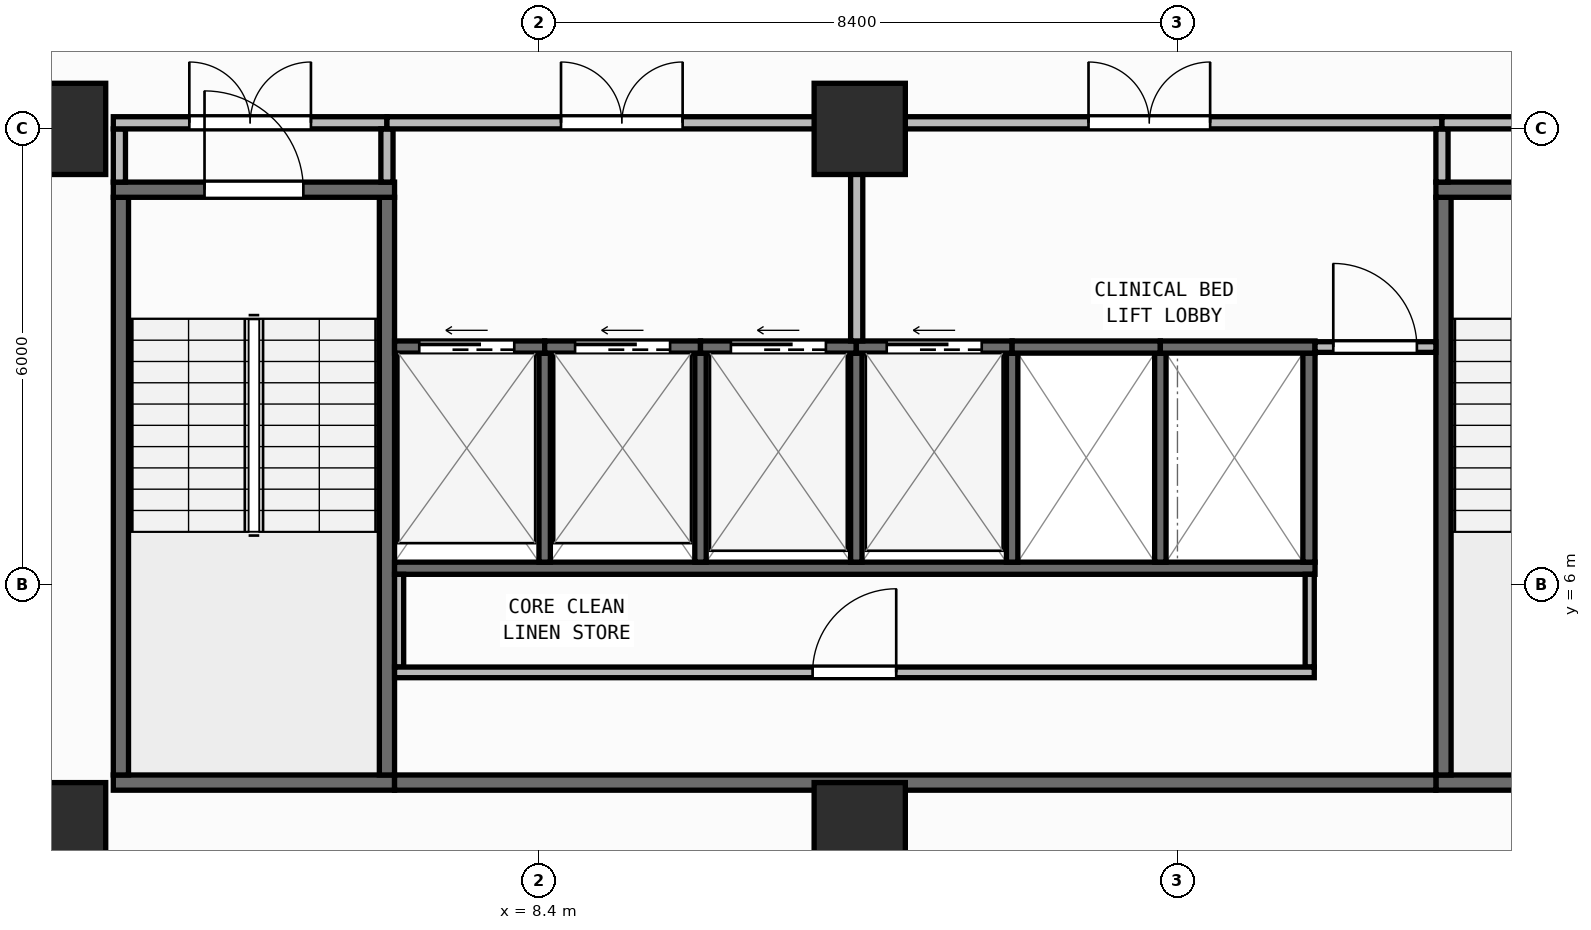
"""IFC4 building model, lengths in metres.
Left out: names, types, materials, properties, quantities, classifications, styles, units other than length and angle.
Written with IfcOpenShell. Run it as: python <this file> out.ifc"""

import sys

from ifc_helpers import new_model, si_unit, direction, frame, frame_2d, origin, origin_2d, place, context, subcontext, project, spatial, rectangle, extrude, element, fill, save


model = new_model("IFC4")
c1 = context("Model", 3, precision=1e-05, world=origin(), true_north=direction((0.0, 1.0)))
c2 = subcontext(c1, "Body", "Model", "MODEL_VIEW")
j1 = project(units=[si_unit("LENGTHUNIT", "METRE"), si_unit("PLANEANGLEUNIT", "RADIAN")], contexts=[c1])
p1 = place(None, origin())
s1 = spatial("IfcSite", under=j1, at=p1, CompositionType="ELEMENT")
p2 = place(p1, origin())
s2 = spatial("IfcBuilding", under=s1, at=p2, CompositionType="ELEMENT")
p3 = place(p2, frame((0.0, 0.0, 115.2)))
s3 = spatial("IfcBuildingStorey", under=s2, at=p3, CompositionType="ELEMENT", Elevation=115.2)
for number, where, z_axis, x_axis in (
    (1, (2.1, 2.8, 0.0), (0.0, 0.0, 1.0), (1.0, 0.0, 0.0)),
    (2, (12.62, 2.8, 0.0), (0.0, 0.0, 1.0), (1.0, 0.0, 0.0)),
    (3, (2.1, 12.0, 0.0), (0.0, 0.0, 1.0), (1.0, 0.0, 0.0)),
    (4, (12.62, 12.0, 0.0), (0.0, 0.0, 1.0), (1.0, 0.0, 0.0)),
):
    element("IfcColumn", number, at=place(p3, frame(where, z_axis=z_axis, x_axis=x_axis)), inside=s3, PredefinedType="COLUMN", context=c2, shape_type="SweptSolid", body=[
        extrude(rectangle(XDim=1.2, YDim=1.2, at=origin_2d()), origin(), (0.0, 0.0, 1.0), 3.95),
    ])
p4 = place(p3, frame((2.76, 0.173, 0.0), z_axis=(0.0, 0.0, 1.0), x_axis=(0.996857931723, 0.079210251617, 0.0)))
e5 = element("IfcWall", 5, at=p4, inside=s3, PredefinedType="STANDARD", context=c2, shape_type="SweptSolid", body=[
    extrude(rectangle(XDim=51.442, YDim=0.26, at=frame_2d((25.721, 0.0))), origin(), (0.0, 0.0, 1.0), 3.71),
])
p5 = place(p4, frame((24.521, 0.0, 0.9)))
e6 = element("IfcOpeningElement", 6, at=p5, cuts=e5, PredefinedType="OPENING", context=c2, shape_type="SweptSolid", body=[
    extrude(rectangle(XDim=2.4, YDim=1.65, at=frame_2d((1.2, 0.825))), frame((0.0, 0.14, 0.0), z_axis=(0.0, -1.0, 0.0), x_axis=(1.0, 0.0, 0.0)), (0.0, 0.0, 1.0), 0.28),
])
p6 = place(p3, frame((2.8, 3.4, 0.0), z_axis=(0.0, 0.0, 1.0), x_axis=(1.0, 0.0, 0.0)))
e7 = element("IfcWall", 7, at=p6, inside=s3, PredefinedType="SHEAR", context=c2, shape_type="SweptSolid", body=[
    extrude(rectangle(XDim=3.7, YDim=0.2, at=frame_2d((1.85, 0.0))), origin(), (0.0, 0.0, 1.0), 3.71),
])
for number, where, z_axis, x_axis in (
    (8, (2.9, 3.5, 0.0), (0.0, 0.0, 1.0), (0.0, 1.0, 0.0)),
    (9, (6.4, 3.5, 0.0), (0.0, 0.0, 1.0), (0.0, 1.0, 0.0)),
):
    element("IfcWall", number, at=place(p3, frame(where, z_axis=z_axis, x_axis=x_axis)), inside=s3, PredefinedType="SHEAR", context=c2, shape_type="SweptSolid", body=[
        extrude(rectangle(XDim=7.6, YDim=0.2, at=frame_2d((3.8, 0.0))), origin(), (0.0, 0.0, 1.0), 3.71),
    ])
p7 = place(p3, frame((2.8, 11.2, 0.0), z_axis=(0.0, 0.0, 1.0), x_axis=(1.0, 0.0, 0.0)))
e10 = element("IfcWall", 10, at=p7, inside=s3, PredefinedType="SHEAR", context=c2, shape_type="SweptSolid", body=[
    extrude(rectangle(XDim=3.7, YDim=0.2, at=frame_2d((1.85, 0.0))), origin(), (0.0, 0.0, 1.0), 3.71),
])
p8 = place(p7, frame((1.2, 0.0, 0.0)))
e11 = element("IfcOpeningElement", 11, at=p8, cuts=e10, PredefinedType="OPENING", context=c2, shape_type="SweptSolid", body=[
    extrude(rectangle(XDim=1.3, YDim=2.15, at=frame_2d((0.65, 1.075))), frame((0.0, 0.11, 0.0), z_axis=(0.0, -1.0, 0.0), x_axis=(1.0, 0.0, 0.0)), (0.0, 0.0, 1.0), 0.22),
])
p9 = place(p3, frame((20.2, 3.4, 0.0), z_axis=(0.0, 0.0, 1.0), x_axis=(1.0, 0.0, 0.0)))
e12 = element("IfcWall", 12, at=p9, inside=s3, PredefinedType="SHEAR", context=c2, shape_type="SweptSolid", body=[
    extrude(rectangle(XDim=3.7, YDim=0.2, at=frame_2d((1.85, 0.0))), origin(), (0.0, 0.0, 1.0), 3.71),
])
p10 = place(p3, frame((20.3, 3.5, 0.0), z_axis=(0.0, 0.0, 1.0), x_axis=(0.0, 1.0, 0.0)))
e13 = element("IfcWall", 13, at=p10, inside=s3, PredefinedType="SHEAR", context=c2, shape_type="SweptSolid", body=[
    extrude(rectangle(XDim=7.6, YDim=0.2, at=frame_2d((3.8, 0.0))), origin(), (0.0, 0.0, 1.0), 3.71),
])
p11 = place(p3, frame((20.2, 11.2, 0.0), z_axis=(0.0, 0.0, 1.0), x_axis=(1.0, 0.0, 0.0)))
e14 = element("IfcWall", 14, at=p11, inside=s3, PredefinedType="SHEAR", context=c2, shape_type="SweptSolid", body=[
    extrude(rectangle(XDim=3.7, YDim=0.2, at=frame_2d((1.85, 0.0))), origin(), (0.0, 0.0, 1.0), 3.71),
])
p12 = place(p11, frame((1.2, 0.0, 0.0)))
e15 = element("IfcOpeningElement", 15, at=p12, cuts=e14, PredefinedType="OPENING", context=c2, shape_type="SweptSolid", body=[
    extrude(rectangle(XDim=1.3, YDim=2.15, at=frame_2d((0.65, 1.075))), frame((0.0, 0.11, 0.0), z_axis=(0.0, -1.0, 0.0), x_axis=(1.0, 0.0, 0.0)), (0.0, 0.0, 1.0), 0.22),
])
p13 = place(p3, frame((6.5, 3.4, 0.0), z_axis=(0.0, 0.0, 1.0), x_axis=(1.0, 0.0, 0.0)))
e16 = element("IfcWall", 16, at=p13, inside=s3, PredefinedType="SHEAR", context=c2, shape_type="SweptSolid", body=[
    extrude(rectangle(XDim=13.7, YDim=0.2, at=frame_2d((6.85, 0.0))), origin(), (0.0, 0.0, 1.0), 3.71),
])
p14 = place(p3, frame((6.5, 6.22, 0.0), z_axis=(0.0, 0.0, 1.0), x_axis=(1.0, 0.0, 0.0)))
e17 = element("IfcWall", 17, at=p14, inside=s3, PredefinedType="SHEAR", context=c2, shape_type="SweptSolid", body=[
    extrude(rectangle(XDim=12.11, YDim=0.16, at=frame_2d((6.055, 0.0))), origin(), (0.0, 0.0, 1.0), 3.71),
])
p15 = place(p3, frame((18.53, 6.3, 0.0), z_axis=(0.0, 0.0, 1.0), x_axis=(0.0, 1.0, 0.0)))
e18 = element("IfcWall", 18, at=p15, inside=s3, PredefinedType="SHEAR", context=c2, shape_type="SweptSolid", body=[
    extrude(rectangle(XDim=2.75, YDim=0.16, at=frame_2d((1.375, 0.0))), origin(), (0.0, 0.0, 1.0), 3.71),
])
for number, where, z_axis, x_axis in (
    (19, (8.475, 6.3, 0.0), (0.0, 0.0, 1.0), (0.0, 1.0, 0.0)),
    (20, (10.525, 6.3, 0.0), (0.0, 0.0, 1.0), (0.0, 1.0, 0.0)),
    (21, (12.575, 6.3, 0.0), (0.0, 0.0, 1.0), (0.0, 1.0, 0.0)),
    (22, (14.625, 6.3, 0.0), (0.0, 0.0, 1.0), (0.0, 1.0, 0.0)),
    (23, (16.575, 6.3, 0.0), (0.0, 0.0, 1.0), (0.0, 1.0, 0.0)),
):
    element("IfcWall", number, at=place(p3, frame(where, z_axis=z_axis, x_axis=x_axis)), inside=s3, PredefinedType="SHEAR", context=c2, shape_type="SweptSolid", body=[
        extrude(rectangle(XDim=2.75, YDim=0.15, at=frame_2d((1.375, 0.0))), origin(), (0.0, 0.0, 1.0), 3.71),
    ])
p16 = place(p3, frame((6.5, 9.13, 0.0), z_axis=(0.0, 0.0, 1.0), x_axis=(1.0, 0.0, 0.0)))
e24 = element("IfcWall", 24, at=p16, inside=s3, PredefinedType="SHEAR", context=c2, shape_type="SweptSolid", body=[
    extrude(rectangle(XDim=1.975, YDim=0.16, at=frame_2d((0.988, 0.0))), origin(), (0.0, 0.0, 1.0), 3.71),
])
p17 = place(p16, frame((0.325, 0.0, 0.0)))
e25 = element("IfcOpeningElement", 25, at=p17, cuts=e24, PredefinedType="OPENING", context=c2, shape_type="SweptSolid", body=[
    extrude(rectangle(XDim=1.25, YDim=2.15, at=frame_2d((0.625, 1.075))), frame((0.0, 0.09, 0.0), z_axis=(0.0, -1.0, 0.0), x_axis=(1.0, 0.0, 0.0)), (0.0, 0.0, 1.0), 0.18),
])
p18 = place(p3, frame((8.475, 9.13, 0.0), z_axis=(0.0, 0.0, 1.0), x_axis=(1.0, 0.0, 0.0)))
e26 = element("IfcWall", 26, at=p18, inside=s3, PredefinedType="SHEAR", context=c2, shape_type="SweptSolid", body=[
    extrude(rectangle(XDim=2.05, YDim=0.16, at=frame_2d((1.025, 0.0))), origin(), (0.0, 0.0, 1.0), 3.71),
])
p19 = place(p18, frame((0.4, 0.0, 0.0)))
e27 = element("IfcOpeningElement", 27, at=p19, cuts=e26, PredefinedType="OPENING", context=c2, shape_type="SweptSolid", body=[
    extrude(rectangle(XDim=1.25, YDim=2.15, at=frame_2d((0.625, 1.075))), frame((0.0, 0.09, 0.0), z_axis=(0.0, -1.0, 0.0), x_axis=(1.0, 0.0, 0.0)), (0.0, 0.0, 1.0), 0.18),
])
p20 = place(p3, frame((10.525, 9.13, 0.0), z_axis=(0.0, 0.0, 1.0), x_axis=(1.0, 0.0, 0.0)))
e28 = element("IfcWall", 28, at=p20, inside=s3, PredefinedType="SHEAR", context=c2, shape_type="SweptSolid", body=[
    extrude(rectangle(XDim=2.05, YDim=0.16, at=frame_2d((1.025, 0.0))), origin(), (0.0, 0.0, 1.0), 3.71),
])
p21 = place(p20, frame((0.4, 0.0, 0.0)))
e29 = element("IfcOpeningElement", 29, at=p21, cuts=e28, PredefinedType="OPENING", context=c2, shape_type="SweptSolid", body=[
    extrude(rectangle(XDim=1.25, YDim=2.15, at=frame_2d((0.625, 1.075))), frame((0.0, 0.09, 0.0), z_axis=(0.0, -1.0, 0.0), x_axis=(1.0, 0.0, 0.0)), (0.0, 0.0, 1.0), 0.18),
])
p22 = place(p3, frame((12.575, 9.13, 0.0), z_axis=(0.0, 0.0, 1.0), x_axis=(1.0, 0.0, 0.0)))
e30 = element("IfcWall", 30, at=p22, inside=s3, PredefinedType="SHEAR", context=c2, shape_type="SweptSolid", body=[
    extrude(rectangle(XDim=2.05, YDim=0.16, at=frame_2d((1.025, 0.0))), origin(), (0.0, 0.0, 1.0), 3.71),
])
p23 = place(p22, frame((0.4, 0.0, 0.0)))
e31 = element("IfcOpeningElement", 31, at=p23, cuts=e30, PredefinedType="OPENING", context=c2, shape_type="SweptSolid", body=[
    extrude(rectangle(XDim=1.25, YDim=2.15, at=frame_2d((0.625, 1.075))), frame((0.0, 0.09, 0.0), z_axis=(0.0, -1.0, 0.0), x_axis=(1.0, 0.0, 0.0)), (0.0, 0.0, 1.0), 0.18),
])
p24 = place(p3, frame((14.625, 9.13, 0.0), z_axis=(0.0, 0.0, 1.0), x_axis=(1.0, 0.0, 0.0)))
e32 = element("IfcWall", 32, at=p24, inside=s3, PredefinedType="SHEAR", context=c2, shape_type="SweptSolid", body=[
    extrude(rectangle(XDim=1.95, YDim=0.16, at=frame_2d((0.975, 0.0))), origin(), (0.0, 0.0, 1.0), 3.71),
])
p25 = place(p3, frame((16.575, 9.13, 0.0), z_axis=(0.0, 0.0, 1.0), x_axis=(1.0, 0.0, 0.0)))
e33 = element("IfcWall", 33, at=p25, inside=s3, PredefinedType="SHEAR", context=c2, shape_type="SweptSolid", body=[
    extrude(rectangle(XDim=2.035, YDim=0.16, at=frame_2d((1.018, 0.0))), origin(), (0.0, 0.0, 1.0), 3.71),
])
for number, where, z_axis, x_axis in (
    (34, (6.56, 4.92, 0.0), (0.0, 0.0, 1.0), (0.0, 1.0, 0.0)),
    (35, (18.54, 4.92, 0.0), (0.0, 0.0, 1.0), (0.0, 1.0, 0.0)),
):
    element("IfcWall", number, at=place(p3, frame(where, z_axis=z_axis, x_axis=x_axis)), inside=s3, PredefinedType="PARTITIONING", context=c2, shape_type="SweptSolid", body=[
        extrude(rectangle(XDim=1.22, YDim=0.12, at=frame_2d((0.61, 0.0))), origin(), (0.0, 0.0, 1.0), 3.71),
    ])
p26 = place(p3, frame((6.5, 4.85, 0.0), z_axis=(0.0, 0.0, 1.0), x_axis=(1.0, 0.0, 0.0)))
e36 = element("IfcWall", 36, at=p26, inside=s3, PredefinedType="PARTITIONING", context=c2, shape_type="SweptSolid", body=[
    extrude(rectangle(XDim=12.1, YDim=0.14, at=frame_2d((6.05, 0.0))), origin(), (0.0, 0.0, 1.0), 3.71),
])
p27 = place(p26, frame((5.5, 0.0, 0.0)))
e37 = element("IfcOpeningElement", 37, at=p27, cuts=e36, PredefinedType="OPENING", context=c2, shape_type="SweptSolid", body=[
    extrude(rectangle(XDim=1.1, YDim=2.1, at=frame_2d((0.55, 1.05))), frame((0.0, 0.08, 0.0), z_axis=(0.0, -1.0, 0.0), x_axis=(1.0, 0.0, 0.0)), (0.0, 0.0, 1.0), 0.16),
])
p28 = place(p3, frame((18.61, 9.13, 0.0), z_axis=(0.0, 0.0, 1.0), x_axis=(1.0, 0.0, 0.0)))
e38 = element("IfcWall", 38, at=p28, inside=s3, PredefinedType="PARTITIONING", context=c2, shape_type="SweptSolid", body=[
    extrude(rectangle(XDim=1.59, YDim=0.14, at=frame_2d((0.795, 0.0))), origin(), (0.0, 0.0, 1.0), 3.71),
])
p29 = place(p28, frame((0.24, 0.0, 0.0)))
e39 = element("IfcOpeningElement", 39, at=p29, cuts=e38, PredefinedType="OPENING", context=c2, shape_type="SweptSolid", body=[
    extrude(rectangle(XDim=1.1, YDim=2.1, at=frame_2d((0.55, 1.05))), frame((0.0, 0.08, 0.0), z_axis=(0.0, -1.0, 0.0), x_axis=(1.0, 0.0, 0.0)), (0.0, 0.0, 1.0), 0.16),
])
p30 = place(p3, frame((2.88, 11.3, 0.0), z_axis=(0.0, 0.0, 1.0), x_axis=(0.0, 1.0, 0.0)))
e40 = element("IfcWall", 40, at=p30, inside=s3, PredefinedType="PARTITIONING", context=c2, shape_type="SweptSolid", body=[
    extrude(rectangle(XDim=0.7, YDim=0.16, at=frame_2d((0.35, 0.0))), origin(), (0.0, 0.0, 1.0), 3.71),
])
p31 = place(p3, frame((2.8, 12.08, 0.0), z_axis=(0.0, 0.0, 1.0), x_axis=(1.0, 0.0, 0.0)))
e41 = element("IfcWall", 41, at=p31, inside=s3, PredefinedType="PARTITIONING", context=c2, shape_type="SweptSolid", body=[
    extrude(rectangle(XDim=3.6, YDim=0.16, at=frame_2d((1.8, 0.0))), origin(), (0.0, 0.0, 1.0), 3.083),
])
p32 = place(p31, frame((1.0, 0.0, 0.0)))
e42 = element("IfcOpeningElement", 42, at=p32, cuts=e41, PredefinedType="OPENING", context=c2, shape_type="SweptSolid", body=[
    extrude(rectangle(XDim=1.6, YDim=2.05, at=frame_2d((0.8, 1.025))), frame((0.0, 0.09, 0.0), z_axis=(0.0, -1.0, 0.0), x_axis=(1.0, 0.0, 0.0)), (0.0, 0.0, 1.0), 0.18),
])
p33 = place(p3, frame((6.4, 11.3, 0.0), z_axis=(0.0, 0.0, 1.0), x_axis=(0.0, 1.0, 0.0)))
e43 = element("IfcWall", 43, at=p33, inside=s3, PredefinedType="PARTITIONING", context=c2, shape_type="SweptSolid", body=[
    extrude(rectangle(XDim=0.7, YDim=0.16, at=frame_2d((0.35, 0.0))), origin(), (0.0, 0.0, 1.0), 3.71),
])
p34 = place(p3, frame((6.4, 12.08, 0.0), z_axis=(0.0, 0.0, 1.0), x_axis=(1.0, 0.0, 0.0)))
e44 = element("IfcWall", 44, at=p34, inside=s3, PredefinedType="PARTITIONING", context=c2, shape_type="SweptSolid", body=[
    extrude(rectangle(XDim=6.18, YDim=0.16, at=frame_2d((3.09, 0.0))), origin(), (0.0, 0.0, 1.0), 3.083),
])
p35 = place(p34, frame((2.29, 0.0, 0.0)))
e45 = element("IfcOpeningElement", 45, at=p35, cuts=e44, PredefinedType="OPENING", context=c2, shape_type="SweptSolid", body=[
    extrude(rectangle(XDim=1.6, YDim=2.05, at=frame_2d((0.8, 1.025))), frame((0.0, 0.09, 0.0), z_axis=(0.0, -1.0, 0.0), x_axis=(1.0, 0.0, 0.0)), (0.0, 0.0, 1.0), 0.18),
])
p36 = place(p3, frame((12.58, 9.21, 0.0), z_axis=(0.0, 0.0, 1.0), x_axis=(0.0, 1.0, 0.0)))
e46 = element("IfcWall", 46, at=p36, inside=s3, PredefinedType="PARTITIONING", context=c2, shape_type="SweptSolid", body=[
    extrude(rectangle(XDim=2.79, YDim=0.16, at=frame_2d((1.395, 0.0))), origin(), (0.0, 0.0, 1.0), 3.71),
])
p37 = place(p3, frame((12.58, 12.08, 0.0), z_axis=(0.0, 0.0, 1.0), x_axis=(1.0, 0.0, 0.0)))
e47 = element("IfcWall", 47, at=p37, inside=s3, PredefinedType="PARTITIONING", context=c2, shape_type="SweptSolid", body=[
    extrude(rectangle(XDim=7.7, YDim=0.16, at=frame_2d((3.85, 0.0))), origin(), (0.0, 0.0, 1.0), 3.083),
])
p38 = place(p37, frame((3.05, 0.0, 0.0)))
e48 = element("IfcOpeningElement", 48, at=p38, cuts=e47, PredefinedType="OPENING", context=c2, shape_type="SweptSolid", body=[
    extrude(rectangle(XDim=1.6, YDim=2.05, at=frame_2d((0.8, 1.025))), frame((0.0, 0.09, 0.0), z_axis=(0.0, -1.0, 0.0), x_axis=(1.0, 0.0, 0.0)), (0.0, 0.0, 1.0), 0.18),
])
p39 = place(p3, frame((20.28, 11.3, 0.0), z_axis=(0.0, 0.0, 1.0), x_axis=(0.0, 1.0, 0.0)))
e49 = element("IfcWall", 49, at=p39, inside=s3, PredefinedType="PARTITIONING", context=c2, shape_type="SweptSolid", body=[
    extrude(rectangle(XDim=0.7, YDim=0.16, at=frame_2d((0.35, 0.0))), origin(), (0.0, 0.0, 1.0), 3.71),
])
p40 = place(p3, frame((20.28, 12.08, 0.0), z_axis=(0.0, 0.0, 1.0), x_axis=(1.0, 0.0, 0.0)))
e50 = element("IfcWall", 50, at=p40, inside=s3, PredefinedType="PARTITIONING", context=c2, shape_type="SweptSolid", body=[
    extrude(rectangle(XDim=3.62, YDim=0.16, at=frame_2d((1.81, 0.0))), origin(), (0.0, 0.0, 1.0), 3.083),
])
p41 = place(p40, frame((1.01, 0.0, 0.0)))
e51 = element("IfcOpeningElement", 51, at=p41, cuts=e50, PredefinedType="OPENING", context=c2, shape_type="SweptSolid", body=[
    extrude(rectangle(XDim=1.6, YDim=2.05, at=frame_2d((0.8, 1.025))), frame((0.0, 0.09, 0.0), z_axis=(0.0, -1.0, 0.0), x_axis=(1.0, 0.0, 0.0)), (0.0, 0.0, 1.0), 0.18),
])
p42 = place(p8, origin())
e52 = element("IfcDoor", 52, at=p42, inside=s3, OperationType="SINGLE_SWING_LEFT", PredefinedType="DOOR", context=c2, shape_type="SweptSolid", body=[
    extrude(rectangle(XDim=1.3, YDim=2.15, at=frame_2d((0.65, 1.075))), frame((0.0, 0.025, 0.0), z_axis=(0.0, -1.0, 0.0), x_axis=(1.0, 0.0, 0.0)), (0.0, 0.0, 1.0), 0.05),
])
fill(e11, e52)
p43 = place(p17, origin())
e53 = element("IfcDoor", 53, at=p43, inside=s3, OperationType="SLIDING_TO_LEFT", PredefinedType="DOOR", context=c2, shape_type="SweptSolid", body=[
    extrude(rectangle(XDim=1.25, YDim=2.15, at=frame_2d((0.625, 1.075))), frame((0.0, 0.025, 0.0), z_axis=(0.0, -1.0, 0.0), x_axis=(1.0, 0.0, 0.0)), (0.0, 0.0, 1.0), 0.05),
])
fill(e25, e53)
p44 = place(p19, origin())
e54 = element("IfcDoor", 54, at=p44, inside=s3, OperationType="SLIDING_TO_LEFT", PredefinedType="DOOR", context=c2, shape_type="SweptSolid", body=[
    extrude(rectangle(XDim=1.25, YDim=2.15, at=frame_2d((0.625, 1.075))), frame((0.0, 0.025, 0.0), z_axis=(0.0, -1.0, 0.0), x_axis=(1.0, 0.0, 0.0)), (0.0, 0.0, 1.0), 0.05),
])
fill(e27, e54)
p45 = place(p21, origin())
e55 = element("IfcDoor", 55, at=p45, inside=s3, OperationType="SLIDING_TO_LEFT", PredefinedType="DOOR", context=c2, shape_type="SweptSolid", body=[
    extrude(rectangle(XDim=1.25, YDim=2.15, at=frame_2d((0.625, 1.075))), frame((0.0, 0.025, 0.0), z_axis=(0.0, -1.0, 0.0), x_axis=(1.0, 0.0, 0.0)), (0.0, 0.0, 1.0), 0.05),
])
fill(e29, e55)
p46 = place(p23, origin())
e56 = element("IfcDoor", 56, at=p46, inside=s3, OperationType="SLIDING_TO_LEFT", PredefinedType="DOOR", context=c2, shape_type="SweptSolid", body=[
    extrude(rectangle(XDim=1.25, YDim=2.15, at=frame_2d((0.625, 1.075))), frame((0.0, 0.025, 0.0), z_axis=(0.0, -1.0, 0.0), x_axis=(1.0, 0.0, 0.0)), (0.0, 0.0, 1.0), 0.05),
])
fill(e31, e56)
p47 = place(p27, origin())
e57 = element("IfcDoor", 57, at=p47, inside=s3, OperationType="SINGLE_SWING_RIGHT", PredefinedType="DOOR", context=c2, shape_type="SweptSolid", body=[
    extrude(rectangle(XDim=1.1, YDim=2.1, at=frame_2d((0.55, 1.05))), frame((0.0, 0.025, 0.0), z_axis=(0.0, -1.0, 0.0), x_axis=(1.0, 0.0, 0.0)), (0.0, 0.0, 1.0), 0.05),
])
fill(e37, e57)
p48 = place(p29, origin())
e58 = element("IfcDoor", 58, at=p48, inside=s3, OperationType="SINGLE_SWING_LEFT", PredefinedType="DOOR", context=c2, shape_type="SweptSolid", body=[
    extrude(rectangle(XDim=1.1, YDim=2.1, at=frame_2d((0.55, 1.05))), frame((0.0, 0.025, 0.0), z_axis=(0.0, -1.0, 0.0), x_axis=(1.0, 0.0, 0.0)), (0.0, 0.0, 1.0), 0.05),
])
fill(e39, e58)
p49 = place(p32, origin())
e59 = element("IfcDoor", 59, at=p49, inside=s3, OperationType="DOUBLE_DOOR_SINGLE_SWING", PredefinedType="DOOR", context=c2, shape_type="SweptSolid", body=[
    extrude(rectangle(XDim=1.6, YDim=2.05, at=frame_2d((0.8, 1.025))), frame((0.0, 0.025, 0.0), z_axis=(0.0, -1.0, 0.0), x_axis=(1.0, 0.0, 0.0)), (0.0, 0.0, 1.0), 0.05),
])
fill(e42, e59)
p50 = place(p35, origin())
e60 = element("IfcDoor", 60, at=p50, inside=s3, OperationType="DOUBLE_DOOR_SINGLE_SWING", PredefinedType="DOOR", context=c2, shape_type="SweptSolid", body=[
    extrude(rectangle(XDim=1.6, YDim=2.05, at=frame_2d((0.8, 1.025))), frame((0.0, 0.025, 0.0), z_axis=(0.0, -1.0, 0.0), x_axis=(1.0, 0.0, 0.0)), (0.0, 0.0, 1.0), 0.05),
])
fill(e45, e60)
p51 = place(p38, origin())
e61 = element("IfcDoor", 61, at=p51, inside=s3, OperationType="DOUBLE_DOOR_SINGLE_SWING", PredefinedType="DOOR", context=c2, shape_type="SweptSolid", body=[
    extrude(rectangle(XDim=1.6, YDim=2.05, at=frame_2d((0.8, 1.025))), frame((0.0, 0.025, 0.0), z_axis=(0.0, -1.0, 0.0), x_axis=(1.0, 0.0, 0.0)), (0.0, 0.0, 1.0), 0.05),
])
fill(e48, e61)
save(model, sys.argv[1])
